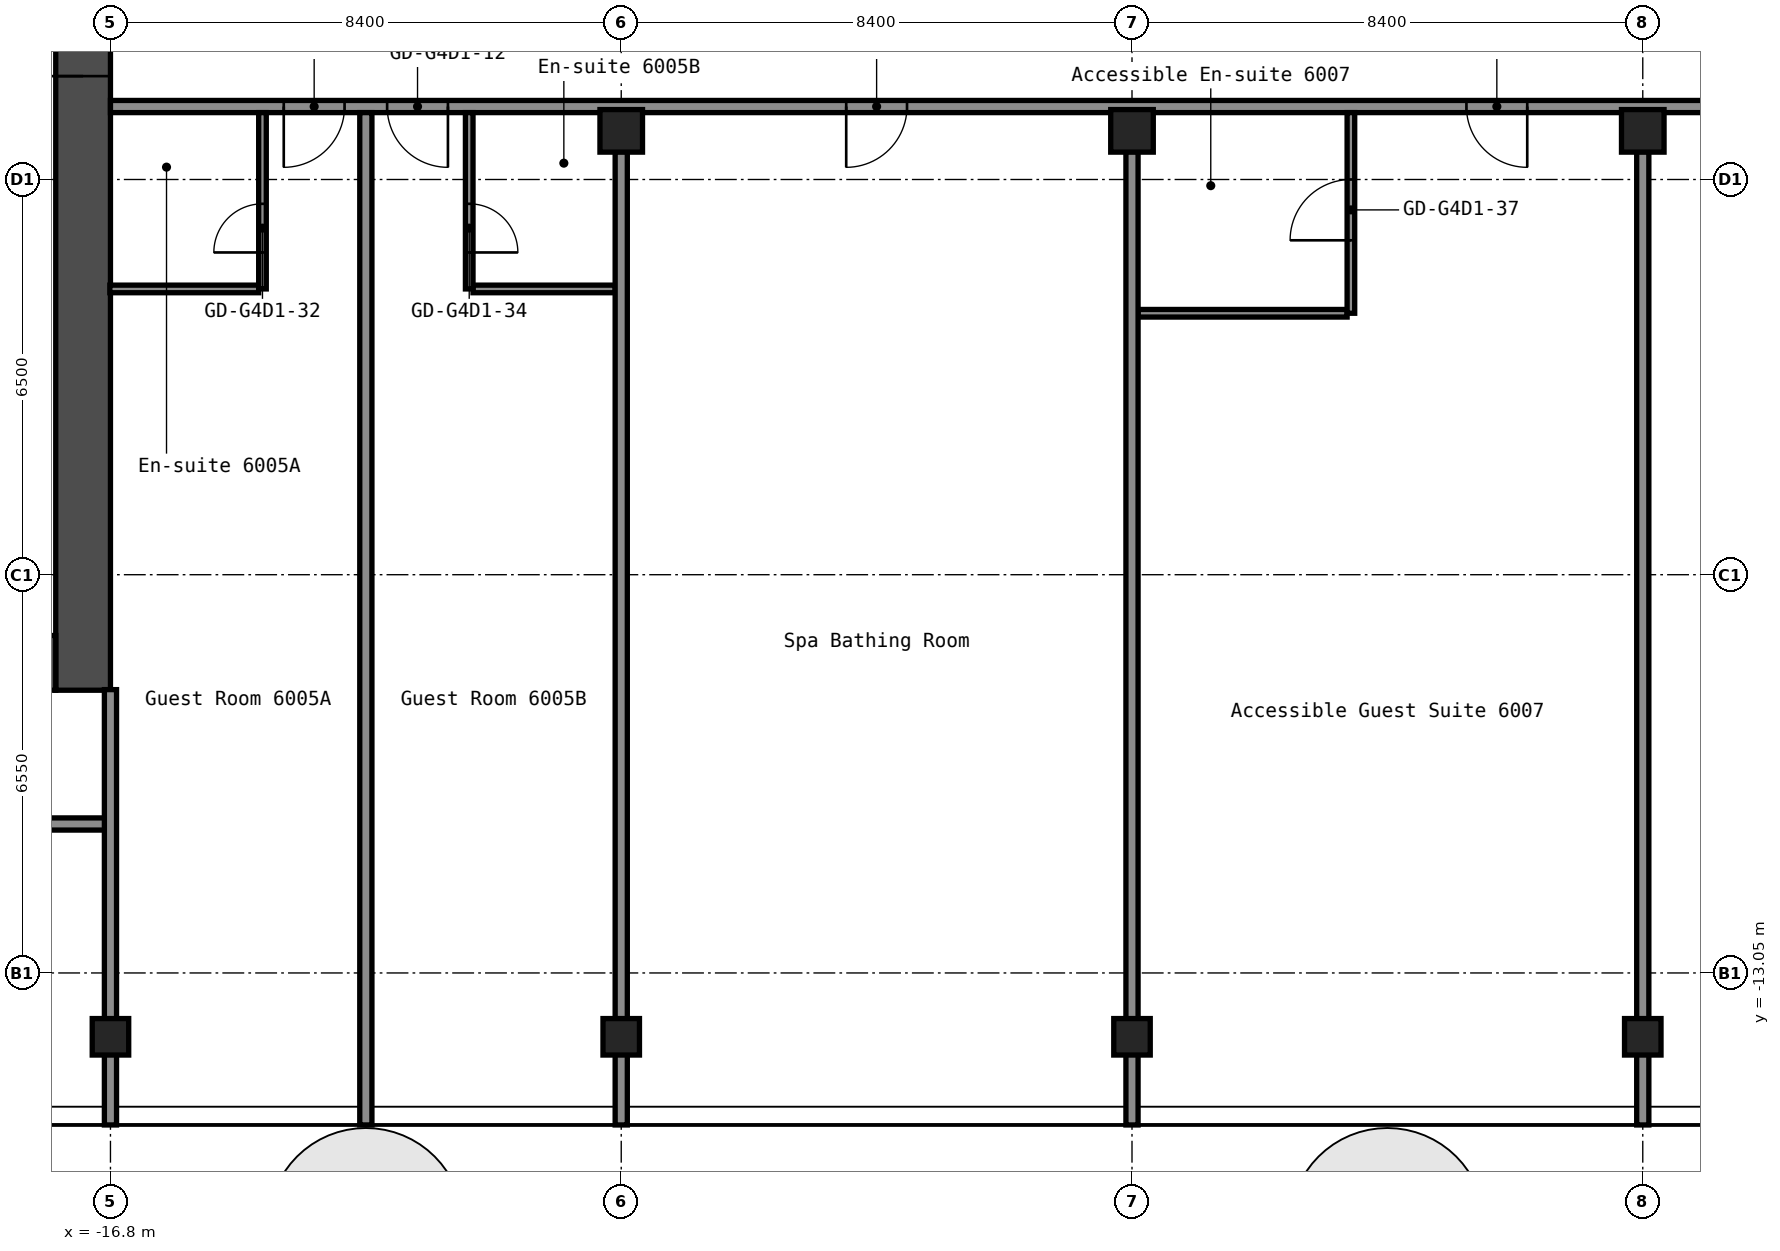
"""IFC4 building model, lengths in metres.
Left out: names, types, materials, properties, quantities, classifications, styles, units other than length and angle.
Written with IfcOpenShell. Run it as: python <this file> out.ifc"""

import sys

from ifc_helpers import new_model, si_unit, direction, frame, frame_2d, origin, origin_2d, place, context, subcontext, project, spatial, rectangle, hollow_rectangle, extrude, element, fill, save


model = new_model("IFC4")
c1 = context("Model", 3, precision=1e-05, world=origin(), true_north=direction((0.0, 1.0)))
c2 = subcontext(c1, "Body", "Model", "MODEL_VIEW")
j1 = project(units=[si_unit("LENGTHUNIT", "METRE"), si_unit("PLANEANGLEUNIT", "RADIAN")], contexts=[c1])
p1 = place(None, origin())
s1 = spatial("IfcSite", under=j1, at=p1, CompositionType="ELEMENT")
p2 = place(p1, origin())
s2 = spatial("IfcBuilding", under=s1, at=p2, CompositionType="ELEMENT")
p3 = place(p2, frame((0.0, 0.0, 212.2)))
s3 = spatial("IfcBuildingStorey", under=s2, at=p3, CompositionType="ELEMENT", Elevation=212.2)
for number, where, z_axis, x_axis in (
    (1, (-16.8, -14.1, 0.0), (0.0, 0.0, 1.0), (1.0, 0.0, 0.0)),
    (2, (-8.4, -14.1, 0.0), (0.0, 0.0, 1.0), (1.0, 0.0, 0.0)),
):
    element("IfcColumn", number, at=place(p3, frame(where, z_axis=z_axis, x_axis=x_axis)), inside=s3, PredefinedType="COLUMN", context=c2, shape_type="SweptSolid", body=[
        extrude(hollow_rectangle(XDim=0.6, YDim=0.6, WallThickness=0.025, InnerFilletRadius=0.038, OuterFilletRadius=0.062, at=origin_2d()), origin(), (0.0, 0.0, 1.0), 2.75),
    ])
p4 = place(p3, frame((-8.4, 0.8, 0.0), z_axis=(0.0, 0.0, 1.0), x_axis=(1.0, 0.0, 0.0)))
e3 = element("IfcColumn", 3, at=p4, inside=s3, PredefinedType="COLUMN", context=c2, shape_type="SweptSolid", body=[
    extrude(hollow_rectangle(XDim=0.7, YDim=0.7, WallThickness=0.028, at=origin_2d()), origin(), (0.0, 0.0, 1.0), 2.75),
])
p5 = place(p3, frame((0.0, -14.1, 0.0), z_axis=(0.0, 0.0, 1.0), x_axis=(1.0, 0.0, 0.0)))
e4 = element("IfcColumn", 4, at=p5, inside=s3, PredefinedType="COLUMN", context=c2, shape_type="SweptSolid", body=[
    extrude(hollow_rectangle(XDim=0.6, YDim=0.6, WallThickness=0.025, InnerFilletRadius=0.038, OuterFilletRadius=0.062, at=origin_2d()), origin(), (0.0, 0.0, 1.0), 2.75),
])
p6 = place(p3, frame((0.0, 0.8, 0.0), z_axis=(0.0, 0.0, 1.0), x_axis=(1.0, 0.0, 0.0)))
e5 = element("IfcColumn", 5, at=p6, inside=s3, PredefinedType="COLUMN", context=c2, shape_type="SweptSolid", body=[
    extrude(hollow_rectangle(XDim=0.7, YDim=0.7, WallThickness=0.028, at=origin_2d()), origin(), (0.0, 0.0, 1.0), 2.75),
])
p7 = place(p3, frame((8.4, -14.1, 0.0), z_axis=(0.0, 0.0, 1.0), x_axis=(1.0, 0.0, 0.0)))
e6 = element("IfcColumn", 6, at=p7, inside=s3, PredefinedType="COLUMN", context=c2, shape_type="SweptSolid", body=[
    extrude(hollow_rectangle(XDim=0.6, YDim=0.6, WallThickness=0.025, InnerFilletRadius=0.038, OuterFilletRadius=0.062, at=origin_2d()), origin(), (0.0, 0.0, 1.0), 2.75),
])
p8 = place(p3, frame((8.4, 0.8, 0.0), z_axis=(0.0, 0.0, 1.0), x_axis=(1.0, 0.0, 0.0)))
e7 = element("IfcColumn", 7, at=p8, inside=s3, PredefinedType="COLUMN", context=c2, shape_type="SweptSolid", body=[
    extrude(hollow_rectangle(XDim=0.7, YDim=0.7, WallThickness=0.028, at=origin_2d()), origin(), (0.0, 0.0, 1.0), 2.75),
])
p9 = place(p3, frame((-17.25, -8.4, 0.0), z_axis=(0.0, 0.0, 1.0), x_axis=(0.0, 1.0, 0.0)))
e8 = element("IfcWall", 8, at=p9, inside=s3, PredefinedType="SHEAR", context=c2, shape_type="SweptSolid", body=[
    extrude(rectangle(XDim=16.8, YDim=0.9, at=frame_2d((8.4, 0.0))), origin(), (0.0, 0.0, 1.0), 2.75),
])
p10 = place(p9, frame((10.1, 0.0, 0.0)))
e9 = element("IfcOpeningElement", 9, at=p10, cuts=e8, PredefinedType="OPENING", context=c2, shape_type="SweptSolid", body=[
    extrude(rectangle(XDim=1.6, YDim=2.1, at=frame_2d((0.8, 1.05))), frame((0.0, 0.46, 0.0), z_axis=(0.0, -1.0, 0.0), x_axis=(1.0, 0.0, 0.0)), (0.0, 0.0, 1.0), 0.92),
])
p11 = place(p3, frame((-32.7, -7.95, 0.0), z_axis=(0.0, 0.0, 1.0), x_axis=(1.0, 0.0, 0.0)))
e10 = element("IfcWall", 10, at=p11, inside=s3, PredefinedType="SHEAR", context=c2, shape_type="SweptSolid", body=[
    extrude(rectangle(XDim=15.0, YDim=0.9, at=frame_2d((7.5, 0.0))), origin(), (0.0, 0.0, 1.0), 2.75),
])
p12 = place(p11, frame((11.45, 0.0, 0.0)))
e11 = element("IfcOpeningElement", 11, at=p12, cuts=e10, PredefinedType="OPENING", context=c2, shape_type="SweptSolid", body=[
    extrude(rectangle(XDim=1.0, YDim=2.1, at=frame_2d((0.5, 1.05))), frame((0.0, 0.46, 0.0), z_axis=(0.0, -1.0, 0.0), x_axis=(1.0, 0.0, 0.0)), (0.0, 0.0, 1.0), 0.92),
])
p13 = place(p3, frame((-38.1, -10.6, 0.0), z_axis=(0.0, 0.0, 1.0), x_axis=(1.0, 0.0, 0.0)))
e12 = element("IfcWall", 12, at=p13, inside=s3, PredefinedType="PARTITIONING", context=c2, shape_type="SweptSolid", body=[
    extrude(rectangle(XDim=21.3, YDim=0.2, at=frame_2d((10.65, 0.0))), origin(), (0.0, 0.0, 1.0), 2.75),
])
p14 = place(p13, frame((1.95, 0.0, 0.0)))
e13 = element("IfcOpeningElement", 13, at=p14, cuts=e12, PredefinedType="OPENING", context=c2, shape_type="SweptSolid", body=[
    extrude(rectangle(XDim=0.9, YDim=2.1, at=frame_2d((0.45, 1.05))), frame((0.0, 0.11, 0.0), z_axis=(0.0, -1.0, 0.0), x_axis=(1.0, 0.0, 0.0)), (0.0, 0.0, 1.0), 0.22),
])
p15 = place(p13, frame((6.4, 0.0, 0.0)))
e14 = element("IfcOpeningElement", 14, at=p15, cuts=e12, PredefinedType="OPENING", context=c2, shape_type="SweptSolid", body=[
    extrude(rectangle(XDim=0.9, YDim=2.1, at=frame_2d((0.45, 1.05))), frame((0.0, 0.11, 0.0), z_axis=(0.0, -1.0, 0.0), x_axis=(1.0, 0.0, 0.0)), (0.0, 0.0, 1.0), 0.22),
])
p16 = place(p13, frame((10.6, 0.0, 0.0)))
e15 = element("IfcOpeningElement", 15, at=p16, cuts=e12, PredefinedType="OPENING", context=c2, shape_type="SweptSolid", body=[
    extrude(rectangle(XDim=0.9, YDim=2.1, at=frame_2d((0.45, 1.05))), frame((0.0, 0.11, 0.0), z_axis=(0.0, -1.0, 0.0), x_axis=(1.0, 0.0, 0.0)), (0.0, 0.0, 1.0), 0.22),
])
p17 = place(p13, frame((16.6, 0.0, 0.0)))
e16 = element("IfcOpeningElement", 16, at=p17, cuts=e12, PredefinedType="OPENING", context=c2, shape_type="SweptSolid", body=[
    extrude(rectangle(XDim=1.0, YDim=2.1, at=frame_2d((0.5, 1.05))), frame((0.0, 0.11, 0.0), z_axis=(0.0, -1.0, 0.0), x_axis=(1.0, 0.0, 0.0)), (0.0, 0.0, 1.0), 0.22),
])
p18 = place(p3, frame((0.1, -2.2, 0.0), z_axis=(0.0, 0.0, 1.0), x_axis=(1.0, 0.0, 0.0)))
e17 = element("IfcWall", 17, at=p18, inside=s3, PredefinedType="PARTITIONING", context=c2, shape_type="SweptSolid", body=[
    extrude(rectangle(XDim=3.438, YDim=0.125, at=frame_2d((1.719, 0.0))), origin(), (0.0, 0.0, 1.0), 2.75),
])
p19 = place(p3, frame((-16.81, -1.8, 0.0), z_axis=(0.0, 0.0, 1.0), x_axis=(1.0, 0.0, 0.0)))
e18 = element("IfcWall", 18, at=p19, inside=s3, PredefinedType="PARTITIONING", context=c2, shape_type="SweptSolid", body=[
    extrude(rectangle(XDim=2.448, YDim=0.125, at=frame_2d((1.224, 0.0))), origin(), (0.0, 0.0, 1.0), 2.75),
])
p20 = place(p3, frame((-10.837, -1.8, 0.0), z_axis=(0.0, 0.0, 1.0), x_axis=(1.0, 0.0, 0.0)))
e19 = element("IfcWall", 19, at=p20, inside=s3, PredefinedType="PARTITIONING", context=c2, shape_type="SweptSolid", body=[
    extrude(rectangle(XDim=2.337, YDim=0.125, at=frame_2d((1.169, 0.0))), origin(), (0.0, 0.0, 1.0), 2.75),
])
p21 = place(p3, frame((-16.8, 1.2, 0.0), z_axis=(0.0, 0.0, 1.0), x_axis=(1.0, 0.0, 0.0)))
e20 = element("IfcWall", 20, at=p21, inside=s3, PredefinedType="PARTITIONING", context=c2, shape_type="SweptSolid", body=[
    extrude(rectangle(XDim=33.6, YDim=0.2, at=frame_2d((16.8, 0.0))), origin(), (0.0, 0.0, 1.0), 2.75),
])
p22 = place(p21, frame((2.85, 0.0, 0.0)))
e21 = element("IfcOpeningElement", 21, at=p22, cuts=e20, PredefinedType="OPENING", context=c2, shape_type="SweptSolid", body=[
    extrude(rectangle(XDim=1.0, YDim=2.1, at=frame_2d((0.5, 1.05))), frame((0.0, 0.11, 0.0), z_axis=(0.0, -1.0, 0.0), x_axis=(1.0, 0.0, 0.0)), (0.0, 0.0, 1.0), 0.22),
])
p23 = place(p21, frame((4.55, 0.0, 0.0)))
e22 = element("IfcOpeningElement", 22, at=p23, cuts=e20, PredefinedType="OPENING", context=c2, shape_type="SweptSolid", body=[
    extrude(rectangle(XDim=1.0, YDim=2.1, at=frame_2d((0.5, 1.05))), frame((0.0, 0.11, 0.0), z_axis=(0.0, -1.0, 0.0), x_axis=(1.0, 0.0, 0.0)), (0.0, 0.0, 1.0), 0.22),
])
p24 = place(p21, frame((12.1, 0.0, 0.0)))
e23 = element("IfcOpeningElement", 23, at=p24, cuts=e20, PredefinedType="OPENING", context=c2, shape_type="SweptSolid", body=[
    extrude(rectangle(XDim=1.0, YDim=2.1, at=frame_2d((0.5, 1.05))), frame((0.0, 0.11, 0.0), z_axis=(0.0, -1.0, 0.0), x_axis=(1.0, 0.0, 0.0)), (0.0, 0.0, 1.0), 0.22),
])
p25 = place(p21, frame((22.3, 0.0, 0.0)))
e24 = element("IfcOpeningElement", 24, at=p25, cuts=e20, PredefinedType="OPENING", context=c2, shape_type="SweptSolid", body=[
    extrude(rectangle(XDim=1.0, YDim=2.1, at=frame_2d((0.5, 1.05))), frame((0.0, 0.11, 0.0), z_axis=(0.0, -1.0, 0.0), x_axis=(1.0, 0.0, 0.0)), (0.0, 0.0, 1.0), 0.22),
])
p26 = place(p21, frame((27.2, 0.0, 0.0)))
e25 = element("IfcOpeningElement", 25, at=p26, cuts=e20, PredefinedType="OPENING", context=c2, shape_type="SweptSolid", body=[
    extrude(rectangle(XDim=1.0, YDim=2.1, at=frame_2d((0.5, 1.05))), frame((0.0, 0.11, 0.0), z_axis=(0.0, -1.0, 0.0), x_axis=(1.0, 0.0, 0.0)), (0.0, 0.0, 1.0), 0.22),
])
p27 = place(p3, frame((-16.8, -15.55, 0.0), z_axis=(0.0, 0.0, 1.0), x_axis=(0.0, 1.0, 0.0)))
e26 = element("IfcWall", 26, at=p27, inside=s3, PredefinedType="PARTITIONING", context=c2, shape_type="SweptSolid", body=[
    extrude(rectangle(XDim=7.16, YDim=0.2, at=frame_2d((3.58, 0.0))), origin(), (0.0, 0.0, 1.0), 2.75),
])
p28 = place(p3, frame((-14.3, -1.8, 0.0), z_axis=(0.0, 0.0, 1.0), x_axis=(0.0, 1.0, 0.0)))
e27 = element("IfcWall", 27, at=p28, inside=s3, PredefinedType="PARTITIONING", context=c2, shape_type="SweptSolid", body=[
    extrude(rectangle(XDim=2.9, YDim=0.125, at=frame_2d((1.45, 0.0))), origin(), (0.0, 0.0, 1.0), 2.75),
])
p29 = place(p28, frame((0.6, 0.0, 0.0)))
e28 = element("IfcOpeningElement", 28, at=p29, cuts=e27, PredefinedType="OPENING", context=c2, shape_type="SweptSolid", body=[
    extrude(rectangle(XDim=0.8, YDim=2.1, at=frame_2d((0.4, 1.05))), frame((0.0, 0.073, 0.0), z_axis=(0.0, -1.0, 0.0), x_axis=(1.0, 0.0, 0.0)), (0.0, 0.0, 1.0), 0.145),
])
p30 = place(p3, frame((-12.6, -15.55, 0.0), z_axis=(0.0, 0.0, 1.0), x_axis=(0.0, 1.0, 0.0)))
e29 = element("IfcWall", 29, at=p30, inside=s3, PredefinedType="PARTITIONING", context=c2, shape_type="SweptSolid", body=[
    extrude(rectangle(XDim=16.65, YDim=0.2, at=frame_2d((8.325, 0.0))), origin(), (0.0, 0.0, 1.0), 2.75),
])
p31 = place(p3, frame((-10.9, -1.8, 0.0), z_axis=(0.0, 0.0, 1.0), x_axis=(0.0, 1.0, 0.0)))
e30 = element("IfcWall", 30, at=p31, inside=s3, PredefinedType="PARTITIONING", context=c2, shape_type="SweptSolid", body=[
    extrude(rectangle(XDim=2.9, YDim=0.125, at=frame_2d((1.45, 0.0))), origin(), (0.0, 0.0, 1.0), 2.75),
])
p32 = place(p31, frame((0.6, 0.0, 0.0)))
e31 = element("IfcOpeningElement", 31, at=p32, cuts=e30, PredefinedType="OPENING", context=c2, shape_type="SweptSolid", body=[
    extrude(rectangle(XDim=0.8, YDim=2.1, at=frame_2d((0.4, 1.05))), frame((0.0, 0.073, 0.0), z_axis=(0.0, -1.0, 0.0), x_axis=(1.0, 0.0, 0.0)), (0.0, 0.0, 1.0), 0.145),
])
for number, where, z_axis, x_axis in (
    (32, (-8.4, -15.55, 0.0), (0.0, 0.0, 1.0), (0.0, 1.0, 0.0)),
    (33, (0.0, -15.55, 0.0), (0.0, 0.0, 1.0), (0.0, 1.0, 0.0)),
):
    element("IfcWall", number, at=place(p3, frame(where, z_axis=z_axis, x_axis=x_axis)), inside=s3, PredefinedType="PARTITIONING", context=c2, shape_type="SweptSolid", body=[
        extrude(rectangle(XDim=16.01, YDim=0.2, at=frame_2d((8.005, 0.0))), origin(), (0.0, 0.0, 1.0), 2.75),
    ])
p33 = place(p3, frame((3.6, -2.2, 0.0), z_axis=(0.0, 0.0, 1.0), x_axis=(0.0, 1.0, 0.0)))
e34 = element("IfcWall", 34, at=p33, inside=s3, PredefinedType="PARTITIONING", context=c2, shape_type="SweptSolid", body=[
    extrude(rectangle(XDim=3.3, YDim=0.125, at=frame_2d((1.65, 0.0))), origin(), (0.0, 0.0, 1.0), 2.75),
])
p34 = place(p33, frame((1.2, 0.0, 0.0)))
e35 = element("IfcOpeningElement", 35, at=p34, cuts=e34, PredefinedType="OPENING", context=c2, shape_type="SweptSolid", body=[
    extrude(rectangle(XDim=1.0, YDim=2.1, at=frame_2d((0.5, 1.05))), frame((0.0, 0.073, 0.0), z_axis=(0.0, -1.0, 0.0), x_axis=(1.0, 0.0, 0.0)), (0.0, 0.0, 1.0), 0.145),
])
p35 = place(p3, frame((8.4, -15.55, 0.0), z_axis=(0.0, 0.0, 1.0), x_axis=(0.0, 1.0, 0.0)))
e36 = element("IfcWall", 36, at=p35, inside=s3, PredefinedType="PARTITIONING", context=c2, shape_type="SweptSolid", body=[
    extrude(rectangle(XDim=16.01, YDim=0.2, at=frame_2d((8.005, 0.0))), origin(), (0.0, 0.0, 1.0), 2.75),
])
p36 = place(p10, origin())
e37 = element("IfcDoor", 37, at=p36, inside=s3, OperationType="DOUBLE_DOOR_SINGLE_SWING", PredefinedType="DOOR", context=c2, shape_type="SweptSolid", body=[
    extrude(rectangle(XDim=1.6, YDim=2.1, at=frame_2d((0.8, 1.05))), frame((0.0, 0.025, 0.0), z_axis=(0.0, -1.0, 0.0), x_axis=(1.0, 0.0, 0.0)), (0.0, 0.0, 1.0), 0.05),
])
fill(e9, e37)
p37 = place(p22, origin())
e38 = element("IfcDoor", 38, at=p37, inside=s3, OperationType="SINGLE_SWING_LEFT", PredefinedType="DOOR", context=c2, shape_type="SweptSolid", body=[
    extrude(rectangle(XDim=1.0, YDim=2.1, at=frame_2d((0.5, 1.05))), frame((0.0, 0.025, 0.0), z_axis=(0.0, -1.0, 0.0), x_axis=(1.0, 0.0, 0.0)), (0.0, 0.0, 1.0), 0.05),
])
fill(e21, e38)
p38 = place(p23, origin())
e39 = element("IfcDoor", 39, at=p38, inside=s3, OperationType="SINGLE_SWING_RIGHT", PredefinedType="DOOR", context=c2, shape_type="SweptSolid", body=[
    extrude(rectangle(XDim=1.0, YDim=2.1, at=frame_2d((0.5, 1.05))), frame((0.0, 0.025, 0.0), z_axis=(0.0, -1.0, 0.0), x_axis=(1.0, 0.0, 0.0)), (0.0, 0.0, 1.0), 0.05),
])
fill(e22, e39)
p39 = place(p24, origin())
e40 = element("IfcDoor", 40, at=p39, inside=s3, OperationType="SINGLE_SWING_LEFT", PredefinedType="DOOR", context=c2, shape_type="SweptSolid", body=[
    extrude(rectangle(XDim=1.0, YDim=2.1, at=frame_2d((0.5, 1.05))), frame((0.0, 0.025, 0.0), z_axis=(0.0, -1.0, 0.0), x_axis=(1.0, 0.0, 0.0)), (0.0, 0.0, 1.0), 0.05),
])
fill(e23, e40)
p40 = place(p25, origin())
e41 = element("IfcDoor", 41, at=p40, inside=s3, OperationType="SINGLE_SWING_RIGHT", PredefinedType="DOOR", context=c2, shape_type="SweptSolid", body=[
    extrude(rectangle(XDim=1.0, YDim=2.1, at=frame_2d((0.5, 1.05))), frame((0.0, 0.025, 0.0), z_axis=(0.0, -1.0, 0.0), x_axis=(1.0, 0.0, 0.0)), (0.0, 0.0, 1.0), 0.05),
])
fill(e24, e41)
p41 = place(p29, origin())
e42 = element("IfcDoor", 42, at=p41, inside=s3, OperationType="SINGLE_SWING_RIGHT", PredefinedType="DOOR", context=c2, shape_type="SweptSolid", body=[
    extrude(rectangle(XDim=0.8, YDim=2.1, at=frame_2d((0.4, 1.05))), frame((0.0, 0.025, 0.0), z_axis=(0.0, -1.0, 0.0), x_axis=(1.0, 0.0, 0.0)), (0.0, 0.0, 1.0), 0.05),
])
fill(e28, e42)
p42 = place(p32, origin())
e43 = element("IfcDoor", 43, at=p42, inside=s3, OperationType="SINGLE_SWING_LEFT", PredefinedType="DOOR", context=c2, shape_type="SweptSolid", body=[
    extrude(rectangle(XDim=0.8, YDim=2.1, at=frame_2d((0.4, 1.05))), frame((0.0, 0.025, 0.0), z_axis=(0.0, -1.0, 0.0), x_axis=(1.0, 0.0, 0.0)), (0.0, 0.0, 1.0), 0.05),
])
fill(e31, e43)
p43 = place(p34, origin())
e44 = element("IfcDoor", 44, at=p43, inside=s3, OperationType="SINGLE_SWING_RIGHT", PredefinedType="DOOR", context=c2, shape_type="SweptSolid", body=[
    extrude(rectangle(XDim=1.0, YDim=2.1, at=frame_2d((0.5, 1.05))), frame((0.0, 0.025, 0.0), z_axis=(0.0, -1.0, 0.0), x_axis=(1.0, 0.0, 0.0)), (0.0, 0.0, 1.0), 0.05),
])
fill(e35, e44)
save(model, sys.argv[1])
